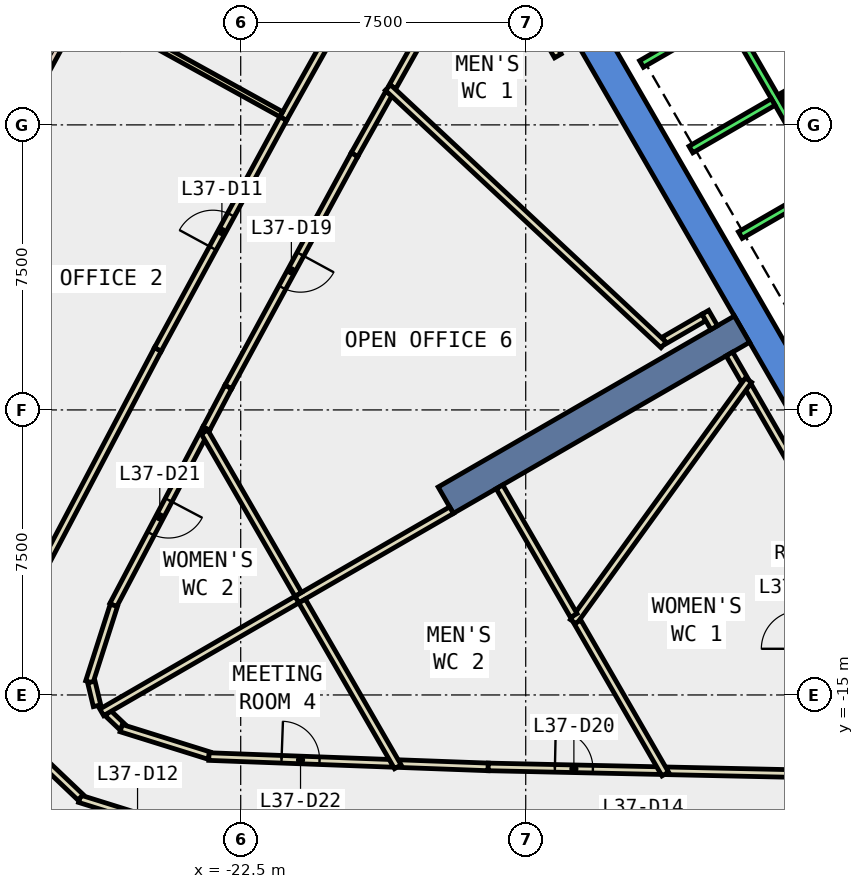
"""IFC4 building model, lengths in metres.
Left out: names, types, materials, properties, quantities, classifications, styles, units other than length and angle.
Written with IfcOpenShell. Run it as: python <this file> out.ifc"""

import sys

from ifc_helpers import new_model, si_unit, direction, frame, frame_2d, origin, place, context, subcontext, project, spatial, polyline, rectangle, outline, extrude, element, fill, save


model = new_model("IFC4")
c1 = context("Model", 3, precision=1e-05, world=origin(), true_north=direction((0.0, 1.0)))
c2 = subcontext(c1, "Body", "Model", "MODEL_VIEW")
j1 = project(units=[si_unit("LENGTHUNIT", "METRE"), si_unit("PLANEANGLEUNIT", "RADIAN")], contexts=[c1])
p1 = place(None, origin())
s1 = spatial("IfcSite", under=j1, at=p1, CompositionType="ELEMENT")
p2 = place(p1, origin())
s2 = spatial("IfcBuilding", under=s1, at=p2, CompositionType="ELEMENT")
p3 = place(p2, frame((0.0, 0.0, 167.6)))
s3 = spatial("IfcBuildingStorey", under=s2, at=p3, CompositionType="ELEMENT", Elevation=167.6)
p4 = place(p3, frame((0.0, 0.0, -0.4)))
e1 = element("IfcWall", 1, at=p4, inside=s3, PredefinedType="SHEAR", context=c2, shape_type="SweptSolid", body=[
    extrude(outline(polyline([(-13.856, 2.5), (-6.928, -9.5), (-6.466, -8.7), (-12.933, 2.5), (-13.856, 2.5)])), origin(), (0.0, 0.0, 1.0), 4.2),
])
p5 = place(p3, frame((-9.31, -5.375, -0.4), z_axis=(0.0, 0.0, 1.0), x_axis=(-0.866017533419, -0.500013631625, 0.0)))
e2 = element("IfcWall", 2, at=p5, inside=s3, PredefinedType="SHEAR", context=c2, shape_type="SweptSolid", body=[
    extrude(rectangle(XDim=9.0, YDim=0.8, at=frame_2d((4.5, 0.0))), origin(), (0.0, 0.0, 1.0), 4.2),
])
p6 = place(p3, frame((-26.991, 2.72, 0.0), z_axis=(0.0, 0.0, 1.0), x_axis=(-0.477555226268, -0.878601733361, 0.0)))
e3 = element("IfcWall", 3, at=p6, inside=s3, PredefinedType="STANDARD", context=c2, shape_type="SweptSolid", body=[
    extrude(rectangle(XDim=5.964, YDim=0.3, at=frame_2d((2.982, 0.0))), origin(), (0.0, 0.0, 1.0), 3.8),
])
p7 = place(p6, frame((0.491, 0.0, 0.9)))
e4 = element("IfcOpeningElement", 4, at=p7, cuts=e3, PredefinedType="OPENING", context=c2, shape_type="SweptSolid", body=[
    extrude(rectangle(XDim=2.0, YDim=2.6, at=frame_2d((1.0, 1.3))), frame((0.0, 0.16, 0.0), z_axis=(0.0, -1.0, 0.0), x_axis=(1.0, 0.0, 0.0)), (0.0, 0.0, 1.0), 0.32),
])
p8 = place(p6, frame((3.473, 0.0, 0.9)))
e5 = element("IfcOpeningElement", 5, at=p8, cuts=e3, PredefinedType="OPENING", context=c2, shape_type="SweptSolid", body=[
    extrude(rectangle(XDim=2.0, YDim=2.6, at=frame_2d((1.0, 1.3))), frame((0.0, 0.16, 0.0), z_axis=(0.0, -1.0, 0.0), x_axis=(1.0, 0.0, 0.0)), (0.0, 0.0, 1.0), 0.32),
])
p9 = place(p3, frame((-14.154, 1.815, 0.0), z_axis=(0.0, 0.0, 1.0), x_axis=(-0.500038857296, 0.866002968352, 0.0)))
e6 = element("IfcWall", 6, at=p9, inside=s3, PredefinedType="PARTITIONING", context=c2, shape_type="SweptSolid", body=[
    extrude(rectangle(XDim=3.34, YDim=0.2, at=frame_2d((1.67, 0.0))), origin(), (0.0, 0.0, 1.0), 3.8),
])
p10 = place(p3, frame((-16.255, 5.014, 0.0), z_axis=(0.0, 0.0, 1.0), x_axis=(-0.488988017817, -0.87229050117, 0.0)))
e7 = element("IfcWall", 7, at=p10, inside=s3, PredefinedType="PARTITIONING", context=c2, shape_type="SweptSolid", body=[
    extrude(rectangle(XDim=4.599, YDim=0.2, at=frame_2d((2.3, 0.0))), origin(), (0.0, 0.0, 1.0), 3.8),
])
p11 = place(p10, frame((1.8, 0.0, 0.0)))
e8 = element("IfcOpeningElement", 8, at=p11, cuts=e7, PredefinedType="OPENING", context=c2, shape_type="SweptSolid", body=[
    extrude(rectangle(XDim=1.0, YDim=2.1, at=frame_2d((0.5, 1.05))), frame((0.0, 0.11, 0.0), z_axis=(0.0, -1.0, 0.0), x_axis=(1.0, 0.0, 0.0)), (0.0, 0.0, 1.0), 0.22),
])
p12 = place(p3, frame((-11.278, -16.996, 0.0), z_axis=(0.0, 0.0, 1.0), x_axis=(0.999766613119, -0.021603687022, 0.0)))
e9 = element("IfcWall", 9, at=p12, inside=s3, PredefinedType="PARTITIONING", context=c2, shape_type="SweptSolid", body=[
    extrude(rectangle(XDim=3.379, YDim=0.2, at=frame_2d((1.689, 0.0))), origin(), (0.0, 0.0, 1.0), 3.8),
])
p13 = place(p3, frame((-18.602, 0.828, 0.0), z_axis=(0.0, 0.0, 1.0), x_axis=(-0.488969229043, -0.872301033502, 0.0)))
e10 = element("IfcWall", 10, at=p13, inside=s3, PredefinedType="PARTITIONING", context=c2, shape_type="SweptSolid", body=[
    extrude(rectangle(XDim=1.849, YDim=0.2, at=frame_2d((0.924, 0.0))), origin(), (0.0, 0.0, 1.0), 3.8),
])
p14 = place(p3, frame((-19.506, -0.785, 0.0), z_axis=(0.0, 0.0, 1.0), x_axis=(-0.477513909405, -0.878624189472, 0.0)))
e11 = element("IfcWall", 11, at=p14, inside=s3, PredefinedType="PARTITIONING", context=c2, shape_type="SweptSolid", body=[
    extrude(rectangle(XDim=6.956, YDim=0.2, at=frame_2d((3.478, 0.0))), origin(), (0.0, 0.0, 1.0), 3.8),
])
p15 = place(p14, frame((2.978, 0.0, 0.0)))
e12 = element("IfcOpeningElement", 12, at=p15, cuts=e11, PredefinedType="OPENING", context=c2, shape_type="SweptSolid", body=[
    extrude(rectangle(XDim=1.0, YDim=2.1, at=frame_2d((0.5, 1.05))), frame((0.0, 0.11, 0.0), z_axis=(0.0, -1.0, 0.0), x_axis=(1.0, 0.0, 0.0)), (0.0, 0.0, 1.0), 0.22),
])
p16 = place(p3, frame((-22.828, -6.897, 0.0), z_axis=(0.0, 0.0, 1.0), x_axis=(-0.467225806893, -0.884138023938, 0.0)))
e13 = element("IfcWall", 13, at=p16, inside=s3, PredefinedType="PARTITIONING", context=c2, shape_type="SweptSolid", body=[
    extrude(rectangle(XDim=1.237, YDim=0.2, at=frame_2d((0.619, 0.0))), origin(), (0.0, 0.0, 1.0), 3.8),
])
p17 = place(p3, frame((-18.316, -16.807, 0.0), z_axis=(0.0, 0.0, 1.0), x_axis=(0.999315981353, -0.036980662692, 0.0)))
e14 = element("IfcWall", 14, at=p17, inside=s3, PredefinedType="PARTITIONING", context=c2, shape_type="SweptSolid", body=[
    extrude(rectangle(XDim=2.331, YDim=0.2, at=frame_2d((1.165, 0.0))), origin(), (0.0, 0.0, 1.0), 3.8),
])
p18 = place(p3, frame((-15.987, -16.893, 0.0), z_axis=(0.0, 0.0, 1.0), x_axis=(0.999764376572, -0.021706942174, 0.0)))
e15 = element("IfcWall", 15, at=p18, inside=s3, PredefinedType="PARTITIONING", context=c2, shape_type="SweptSolid", body=[
    extrude(rectangle(XDim=4.51, YDim=0.2, at=frame_2d((2.255, 0.0))), origin(), (0.0, 0.0, 1.0), 3.8),
])
p19 = place(p18, frame((1.755, 0.0, 0.0)))
e16 = element("IfcOpeningElement", 16, at=p19, cuts=e15, PredefinedType="OPENING", context=c2, shape_type="SweptSolid", body=[
    extrude(rectangle(XDim=1.0, YDim=2.1, at=frame_2d((0.5, 1.05))), frame((0.0, 0.11, 0.0), z_axis=(0.0, -1.0, 0.0), x_axis=(1.0, 0.0, 0.0)), (0.0, 0.0, 1.0), 0.22),
])
p20 = place(p3, frame((-23.406, -7.991, 0.0), z_axis=(0.0, 0.0, 1.0), x_axis=(-0.466307932558, -0.884622468646, 0.0)))
e17 = element("IfcWall", 17, at=p20, inside=s3, PredefinedType="PARTITIONING", context=c2, shape_type="SweptSolid", body=[
    extrude(rectangle(XDim=5.25, YDim=0.2, at=frame_2d((2.625, 0.0))), origin(), (0.0, 0.0, 1.0), 3.8),
])
p21 = place(p20, frame((2.125, 0.0, 0.0)))
e18 = element("IfcOpeningElement", 18, at=p21, cuts=e17, PredefinedType="OPENING", context=c2, shape_type="SweptSolid", body=[
    extrude(rectangle(XDim=1.0, YDim=2.1, at=frame_2d((0.5, 1.05))), frame((0.0, 0.11, 0.0), z_axis=(0.0, -1.0, 0.0), x_axis=(1.0, 0.0, 0.0)), (0.0, 0.0, 1.0), 0.22),
])
p22 = place(p3, frame((-25.838, -12.642, 0.0), z_axis=(0.0, 0.0, 1.0), x_axis=(-0.305169069368, -0.952298188122, 0.0)))
e19 = element("IfcWall", 19, at=p22, inside=s3, PredefinedType="PARTITIONING", context=c2, shape_type="SweptSolid", body=[
    extrude(rectangle(XDim=2.117, YDim=0.2, at=frame_2d((1.059, 0.0))), origin(), (0.0, 0.0, 1.0), 3.8),
])
p23 = place(p3, frame((-26.43, -14.66, 0.0), z_axis=(0.0, 0.0, 1.0), x_axis=(0.233574377125, -0.972338938, 0.0)))
e20 = element("IfcWall", 20, at=p23, inside=s3, PredefinedType="PARTITIONING", context=c2, shape_type="SweptSolid", body=[
    extrude(rectangle(XDim=0.642, YDim=0.2, at=frame_2d((0.321, 0.0))), origin(), (0.0, 0.0, 1.0), 3.8),
])
p24 = place(p3, frame((-25.998, -15.476, 0.0), z_axis=(0.0, 0.0, 1.0), x_axis=(0.724294499657, -0.689490737985, 0.0)))
e21 = element("IfcWall", 21, at=p24, inside=s3, PredefinedType="PARTITIONING", context=c2, shape_type="SweptSolid", body=[
    extrude(rectangle(XDim=0.519, YDim=0.2, at=frame_2d((0.26, 0.0))), origin(), (0.0, 0.0, 1.0), 3.8),
])
p25 = place(p3, frame((-25.645, -15.873, 0.0), z_axis=(0.0, 0.0, 1.0), x_axis=(0.95454810771, -0.298056890655, 0.0)))
e22 = element("IfcWall", 22, at=p25, inside=s3, PredefinedType="PARTITIONING", context=c2, shape_type="SweptSolid", body=[
    extrude(rectangle(XDim=2.422, YDim=0.2, at=frame_2d((1.211, 0.0))), origin(), (0.0, 0.0, 1.0), 3.8),
])
p26 = place(p3, frame((-23.337, -16.621, 0.0), z_axis=(0.0, 0.0, 1.0), x_axis=(0.999311710526, -0.037095892019, 0.0)))
e23 = element("IfcWall", 23, at=p26, inside=s3, PredefinedType="PARTITIONING", context=c2, shape_type="SweptSolid", body=[
    extrude(rectangle(XDim=4.824, YDim=0.2, at=frame_2d((2.412, 0.0))), origin(), (0.0, 0.0, 1.0), 3.8),
])
p27 = place(p26, frame((1.913, 0.0, 0.0)))
e24 = element("IfcOpeningElement", 24, at=p27, cuts=e23, PredefinedType="OPENING", context=c2, shape_type="SweptSolid", body=[
    extrude(rectangle(XDim=1.0, YDim=2.1, at=frame_2d((0.5, 1.05))), frame((0.0, 0.11, 0.0), z_axis=(0.0, -1.0, 0.0), x_axis=(1.0, 0.0, 0.0)), (0.0, 0.0, 1.0), 0.22),
])
p28 = place(p3, frame((-21.381, 0.165, 0.0), z_axis=(0.0, 0.0, 1.0), x_axis=(0.489014139272, 0.872275857509, 0.0)))
e25 = element("IfcWall", 25, at=p28, inside=s3, PredefinedType="PARTITIONING", context=c2, shape_type="SweptSolid", body=[
    extrude(rectangle(XDim=7.057, YDim=0.2, at=frame_2d((3.529, 0.0))), origin(), (0.0, 0.0, 1.0), 3.8),
])
p29 = place(p28, frame((3.029, 0.0, 0.0)))
e26 = element("IfcOpeningElement", 26, at=p29, cuts=e25, PredefinedType="OPENING", context=c2, shape_type="SweptSolid", body=[
    extrude(rectangle(XDim=1.0, YDim=2.1, at=frame_2d((0.5, 1.05))), frame((0.0, 0.11, 0.0), z_axis=(0.0, -1.0, 0.0), x_axis=(1.0, 0.0, 0.0)), (0.0, 0.0, 1.0), 0.22),
])
p30 = place(p3, frame((-27.798, -11.819, 0.0), z_axis=(0.0, 0.0, 1.0), x_axis=(0.466450727507, 0.884547182918, 0.0)))
e27 = element("IfcWall", 27, at=p30, inside=s3, PredefinedType="PARTITIONING", context=c2, shape_type="SweptSolid", body=[
    extrude(rectangle(XDim=6.685, YDim=0.2, at=frame_2d((3.342, 0.0))), origin(), (0.0, 0.0, 1.0), 3.8),
])
p31 = place(p3, frame((-24.68, -5.906, 0.0), z_axis=(0.0, 0.0, 1.0), x_axis=(0.47757676389, 0.878590026459, 0.0)))
e28 = element("IfcWall", 28, at=p31, inside=s3, PredefinedType="PARTITIONING", context=c2, shape_type="SweptSolid", body=[
    extrude(rectangle(XDim=6.91, YDim=0.2, at=frame_2d((3.455, 0.0))), origin(), (0.0, 0.0, 1.0), 3.8),
])
p32 = place(p31, frame((3.029, 0.0, 0.0)))
e29 = element("IfcOpeningElement", 29, at=p32, cuts=e28, PredefinedType="OPENING", context=c2, shape_type="SweptSolid", body=[
    extrude(rectangle(XDim=1.0, YDim=2.1, at=frame_2d((0.5, 1.05))), frame((0.0, 0.11, 0.0), z_axis=(0.0, -1.0, 0.0), x_axis=(1.0, 0.0, 0.0)), (0.0, 0.0, 1.0), 0.22),
])
p33 = place(p3, frame((-23.691, -18.683, 0.0), z_axis=(0.0, 0.0, 1.0), x_axis=(-0.954546657381, 0.298061535398, 0.0)))
e30 = element("IfcWall", 30, at=p33, inside=s3, PredefinedType="PARTITIONING", context=c2, shape_type="SweptSolid", body=[
    extrude(rectangle(XDim=3.191, YDim=0.2, at=frame_2d((1.596, 0.0))), origin(), (0.0, 0.0, 1.0), 3.8),
])
p34 = place(p33, frame((1.096, 0.0, 0.0)))
e31 = element("IfcOpeningElement", 31, at=p34, cuts=e30, PredefinedType="OPENING", context=c2, shape_type="SweptSolid", body=[
    extrude(rectangle(XDim=1.0, YDim=2.1, at=frame_2d((0.5, 1.05))), frame((0.0, 0.11, 0.0), z_axis=(0.0, -1.0, 0.0), x_axis=(1.0, 0.0, 0.0)), (0.0, 0.0, 1.0), 0.22),
])
p35 = place(p3, frame((-26.714, -17.693, 0.0), z_axis=(0.0, 0.0, 1.0), x_axis=(-0.724712974479, 0.689050872303, 0.0)))
e32 = element("IfcWall", 32, at=p35, inside=s3, PredefinedType="PARTITIONING", context=c2, shape_type="SweptSolid", body=[
    extrude(rectangle(XDim=2.15, YDim=0.2, at=frame_2d((1.075, 0.0))), origin(), (0.0, 0.0, 1.0), 3.8),
])
p36 = place(p3, frame((-7.862, -9.107, 0.0), z_axis=(0.0, 0.0, 1.0), x_axis=(-0.499994038704, 0.866028845513, 0.0)))
e33 = element("IfcWall", 33, at=p36, inside=s3, PredefinedType="PARTITIONING", context=c2, shape_type="SweptSolid", body=[
    extrude(rectangle(XDim=2.568, YDim=0.2, at=frame_2d((1.284, 0.0))), origin(), (0.0, 0.0, 1.0), 3.8),
])
p37 = place(p3, frame((-9.246, -6.71, 0.0), z_axis=(0.0, 0.0, 1.0), x_axis=(-0.499570510076, 0.86627322795, 0.0)))
e34 = element("IfcWall", 34, at=p37, inside=s3, PredefinedType="PARTITIONING", context=c2, shape_type="SweptSolid", body=[
    extrude(rectangle(XDim=0.788, YDim=0.2, at=frame_2d((0.394, 0.0))), origin(), (0.0, 0.0, 1.0), 3.8),
])
p38 = place(p3, frame((-10.31, -5.066, 0.0), z_axis=(0.0, 0.0, 1.0), x_axis=(-0.865587329375, -0.500758000661, 0.0)))
e35 = element("IfcWall", 35, at=p38, inside=s3, PredefinedType="PARTITIONING", context=c2, shape_type="SweptSolid", body=[
    extrude(rectangle(XDim=1.21, YDim=0.2, at=frame_2d((0.605, 0.0))), origin(), (0.0, 0.0, 1.0), 3.8),
])
p39 = place(p3, frame((-11.372, -5.79, 0.0), z_axis=(0.0, 0.0, 1.0), x_axis=(-0.730922728623, 0.682460229451, 0.0)))
e36 = element("IfcWall", 36, at=p39, inside=s3, PredefinedType="PARTITIONING", context=c2, shape_type="SweptSolid", body=[
    extrude(rectangle(XDim=9.924, YDim=0.2, at=frame_2d((4.962, 0.0))), origin(), (0.0, 0.0, 1.0), 3.8),
])
p40 = place(p3, frame((-13.744, -13.076, 0.0), z_axis=(0.0, 0.0, 1.0), x_axis=(0.586577314901, 0.809893235953, 0.0)))
e37 = element("IfcWall", 37, at=p40, inside=s3, PredefinedType="PARTITIONING", context=c2, shape_type="SweptSolid", body=[
    extrude(rectangle(XDim=7.854, YDim=0.2, at=frame_2d((3.927, 0.0))), origin(), (0.0, 0.0, 1.0), 3.8),
])
p41 = place(p3, frame((-11.328, -17.08, 0.0), z_axis=(0.0, 0.0, 1.0), x_axis=(-0.499972710878, 0.866041158593, 0.0)))
e38 = element("IfcWall", 38, at=p41, inside=s3, PredefinedType="PARTITIONING", context=c2, shape_type="SweptSolid", body=[
    extrude(rectangle(XDim=4.616, YDim=0.2, at=frame_2d((2.308, 0.0))), origin(), (0.0, 0.0, 1.0), 3.8),
])
p42 = place(p3, frame((-13.736, -12.909, 0.0), z_axis=(0.0, 0.0, 1.0), x_axis=(-0.49990810406, 0.866078453429, 0.0)))
e39 = element("IfcWall", 39, at=p42, inside=s3, PredefinedType="PARTITIONING", context=c2, shape_type="SweptSolid", body=[
    extrude(rectangle(XDim=3.908, YDim=0.2, at=frame_2d((1.954, 0.0))), origin(), (0.0, 0.0, 1.0), 3.8),
])
p43 = place(p3, frame((-16.952, -10.138, 0.0), z_axis=(0.0, 0.0, 1.0), x_axis=(-0.866054992606, -0.499948747156, 0.0)))
e40 = element("IfcWall", 40, at=p43, inside=s3, PredefinedType="PARTITIONING", context=c2, shape_type="SweptSolid", body=[
    extrude(rectangle(XDim=4.701, YDim=0.2, at=frame_2d((2.35, 0.0))), origin(), (0.0, 0.0, 1.0), 3.8),
])
p44 = place(p3, frame((-20.986, -12.351, 0.0), z_axis=(0.0, 0.0, 1.0), x_axis=(-0.499993851206, 0.866028953763, 0.0)))
e41 = element("IfcWall", 41, at=p44, inside=s3, PredefinedType="PARTITIONING", context=c2, shape_type="SweptSolid", body=[
    extrude(rectangle(XDim=4.932, YDim=0.2, at=frame_2d((2.466, 0.0))), origin(), (0.0, 0.0, 1.0), 3.8),
])
p45 = place(p3, frame((-18.366, -16.89, 0.0), z_axis=(0.0, 0.0, 1.0), x_axis=(-0.499965828395, 0.866045131871, 0.0)))
e42 = element("IfcWall", 42, at=p45, inside=s3, PredefinedType="PARTITIONING", context=c2, shape_type="SweptSolid", body=[
    extrude(rectangle(XDim=5.036, YDim=0.2, at=frame_2d((2.518, 0.0))), origin(), (0.0, 0.0, 1.0), 3.8),
])
p46 = place(p3, frame((-21.021, -12.491, 0.0), z_axis=(0.0, 0.0, 1.0), x_axis=(-0.865966890845, -0.500101333692, 0.0)))
e43 = element("IfcWall", 43, at=p46, inside=s3, PredefinedType="PARTITIONING", context=c2, shape_type="SweptSolid", body=[
    extrude(rectangle(XDim=5.931, YDim=0.2, at=frame_2d((2.965, 0.0))), origin(), (0.0, 0.0, 1.0), 3.8),
])
p47 = place(p3, frame((-21.432, 0.278, 0.0), z_axis=(0.0, 0.0, 1.0), x_axis=(-0.875412579047, 0.483376474857, 0.0)))
e44 = element("IfcWall", 44, at=p47, inside=s3, PredefinedType="PARTITIONING", context=c2, shape_type="SweptSolid", body=[
    extrude(rectangle(XDim=4.531, YDim=0.15, at=frame_2d((2.265, 0.0))), origin(), (0.0, 0.0, 1.0), 3.8),
])
p48 = place(p3, frame((-10.04, -5.334, 0.0), z_axis=(0.0, 0.0, 1.0), x_axis=(-0.499405191234, 0.86636854454, 0.0)))
e45 = element("IfcWall", 45, at=p48, inside=s3, PredefinedType="PARTITIONING", context=c2, shape_type="SweptSolid", body=[
    extrude(rectangle(XDim=0.466, YDim=0.2, at=frame_2d((0.233, 0.0))), origin(), (0.0, 0.0, 1.0), 3.8),
])
p49 = place(p3, frame((-8.192, 0.888, 0.0), z_axis=(0.0, 0.0, 1.0), x_axis=(0.49994636267, -0.866056369097, 0.0)))
e46 = element("IfcWall", 46, at=p49, inside=s3, PredefinedType="STANDARD", context=c2, shape_type="SweptSolid", body=[
    extrude(rectangle(XDim=2.8, YDim=0.2, at=frame_2d((1.4, 0.0))), origin(), (0.0, 0.0, 1.0), 3.8),
])
p50 = place(p3, frame((-9.751, 2.99, 0.0), z_axis=(0.0, 0.0, 1.0), x_axis=(0.50000090737, -0.866024879913, 0.0)))
e47 = element("IfcWall", 47, at=p50, inside=s3, PredefinedType="STANDARD", context=c2, shape_type="SweptSolid", body=[
    extrude(rectangle(XDim=10.6, YDim=0.2, at=frame_2d((5.3, 0.0))), origin(), (0.0, 0.0, 1.0), 3.8),
])
p51 = place(p3, frame((-9.788, 2.853, 0.0), z_axis=(0.0, 0.0, 1.0), x_axis=(-0.865998541277, -0.500046524342, 0.0)))
e48 = element("IfcWall", 48, at=p51, inside=s3, PredefinedType="STANDARD", context=c2, shape_type="SweptSolid", body=[
    extrude(rectangle(XDim=2.5, YDim=0.2, at=frame_2d((1.25, 0.0))), origin(), (0.0, 0.0, 1.0), 3.8),
])
for number, where, z_axis, x_axis in (
    (49, (-8.488, 0.602, 0.0), (0.0, 0.0, 1.0), (-0.866, -0.5, 0.0)),
    (50, (-7.188, -1.65, 0.0), (0.0, 0.0, 1.0), (-0.866, -0.5, 0.0)),
):
    element("IfcWall", number, at=place(p3, frame(where, z_axis=z_axis, x_axis=x_axis)), inside=s3, PredefinedType="STANDARD", context=c2, shape_type="SweptSolid", body=[
        extrude(rectangle(XDim=2.5, YDim=0.2, at=frame_2d((1.25, 0.0))), origin(), (0.0, 0.0, 1.0), 3.8),
    ])
p52 = place(p7, origin())
e51 = element("IfcWindow", 51, at=p52, inside=s3, PartitioningType="SINGLE_PANEL", PredefinedType="WINDOW", context=c2, shape_type="SweptSolid", body=[
    extrude(rectangle(XDim=2.0, YDim=2.6, at=frame_2d((1.0, 1.3))), frame((0.0, 0.03, 0.0), z_axis=(0.0, -1.0, 0.0), x_axis=(1.0, 0.0, 0.0)), (0.0, 0.0, 1.0), 0.06),
])
fill(e4, e51)
p53 = place(p32, origin())
e52 = element("IfcDoor", 52, at=p53, inside=s3, OperationType="SINGLE_SWING_LEFT", PredefinedType="DOOR", context=c2, shape_type="SweptSolid", body=[
    extrude(rectangle(XDim=1.0, YDim=2.1, at=frame_2d((0.5, 1.05))), frame((0.0, 0.025, 0.0), z_axis=(0.0, -1.0, 0.0), x_axis=(1.0, 0.0, 0.0)), (0.0, 0.0, 1.0), 0.05),
])
fill(e29, e52)
p54 = place(p15, origin())
e53 = element("IfcDoor", 53, at=p54, inside=s3, OperationType="SINGLE_SWING_LEFT", PredefinedType="DOOR", context=c2, shape_type="SweptSolid", body=[
    extrude(rectangle(XDim=1.0, YDim=2.1, at=frame_2d((0.5, 1.05))), frame((0.0, 0.025, 0.0), z_axis=(0.0, -1.0, 0.0), x_axis=(1.0, 0.0, 0.0)), (0.0, 0.0, 1.0), 0.05),
])
fill(e12, e53)
p55 = place(p19, origin())
e54 = element("IfcDoor", 54, at=p55, inside=s3, OperationType="SINGLE_SWING_LEFT", PredefinedType="DOOR", context=c2, shape_type="SweptSolid", body=[
    extrude(rectangle(XDim=1.0, YDim=2.1, at=frame_2d((0.5, 1.05))), frame((0.0, 0.025, 0.0), z_axis=(0.0, -1.0, 0.0), x_axis=(1.0, 0.0, 0.0)), (0.0, 0.0, 1.0), 0.05),
])
fill(e16, e54)
p56 = place(p21, origin())
e55 = element("IfcDoor", 55, at=p56, inside=s3, OperationType="SINGLE_SWING_LEFT", PredefinedType="DOOR", context=c2, shape_type="SweptSolid", body=[
    extrude(rectangle(XDim=1.0, YDim=2.1, at=frame_2d((0.5, 1.05))), frame((0.0, 0.025, 0.0), z_axis=(0.0, -1.0, 0.0), x_axis=(1.0, 0.0, 0.0)), (0.0, 0.0, 1.0), 0.05),
])
fill(e18, e55)
p57 = place(p27, origin())
e56 = element("IfcDoor", 56, at=p57, inside=s3, OperationType="SINGLE_SWING_LEFT", PredefinedType="DOOR", context=c2, shape_type="SweptSolid", body=[
    extrude(rectangle(XDim=1.0, YDim=2.1, at=frame_2d((0.5, 1.05))), frame((0.0, 0.025, 0.0), z_axis=(0.0, -1.0, 0.0), x_axis=(1.0, 0.0, 0.0)), (0.0, 0.0, 1.0), 0.05),
])
fill(e24, e56)
save(model, sys.argv[1])
